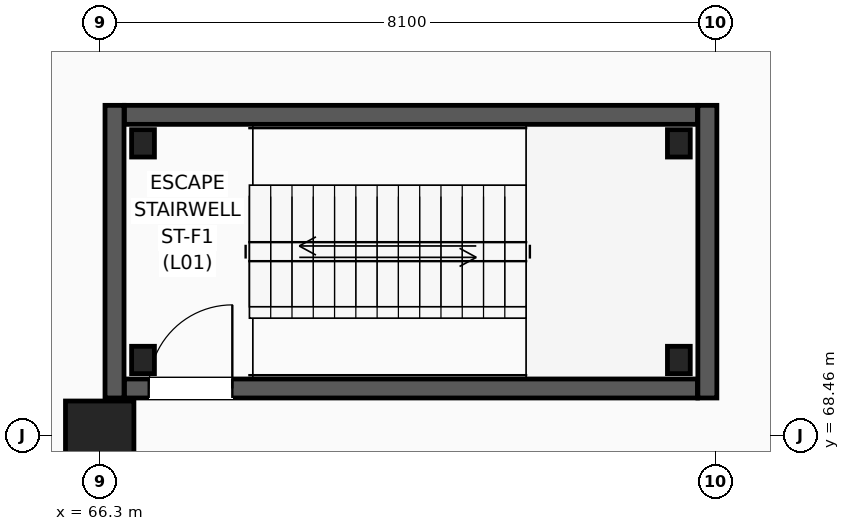
"""IFC4 building model, lengths in metres.
Left out: names, types, materials, properties, quantities, classifications, styles, units other than length and angle.
Written with IfcOpenShell. Run it as: python <this file> out.ifc"""

import sys

from ifc_helpers import new_model, si_unit, direction, frame, frame_2d, origin, origin_2d, place, context, subcontext, project, spatial, rectangle, i_section, extrude, element, fill, save


model = new_model("IFC4")
c1 = context("Model", 3, precision=1e-05, world=origin(), true_north=direction((0.0, 1.0)))
c2 = subcontext(c1, "Body", "Model", "MODEL_VIEW")
j1 = project(units=[si_unit("LENGTHUNIT", "METRE"), si_unit("PLANEANGLEUNIT", "RADIAN")], contexts=[c1])
p1 = place(None, origin())
s1 = spatial("IfcSite", under=j1, at=p1, CompositionType="ELEMENT")
p2 = place(p1, origin())
s2 = spatial("IfcBuilding", under=s1, at=p2, CompositionType="ELEMENT")
p3 = place(p2, frame((0.0, 0.0, 5.4)))
s3 = spatial("IfcBuildingStorey", under=s2, at=p3, CompositionType="ELEMENT", Elevation=5.4)
for number, where, z_axis, x_axis in (
    (1, (66.87, 69.45, 0.0), (0.0, 0.0, 1.0), (1.0, 0.0, 0.0)),
    (2, (66.87, 72.3, 0.0), (0.0, 0.0, 1.0), (1.0, 0.0, 0.0)),
    (3, (73.92, 69.45, 0.0), (0.0, 0.0, 1.0), (1.0, 0.0, 0.0)),
    (4, (73.92, 72.3, 0.0), (0.0, 0.0, 1.0), (1.0, 0.0, 0.0)),
):
    element("IfcColumn", number, at=place(p3, frame(where, z_axis=z_axis, x_axis=x_axis)), inside=s3, PredefinedType="COLUMN", context=c2, shape_type="SweptSolid", body=[
        extrude(i_section(OverallWidth=0.3, OverallDepth=0.36, WebThickness=0.012, FlangeThickness=0.022, FilletRadius=0.027, at=origin_2d()), origin(), (0.0, 0.0, 1.0), 4.8),
    ])
p4 = place(p3, frame((66.3, 68.46, 0.0), z_axis=(0.0, 0.0, 1.0), x_axis=(1.0, 0.0, 0.0)))
e5 = element("IfcColumn", 5, at=p4, inside=s3, PredefinedType="COLUMN", context=c2, shape_type="SweptSolid", body=[
    extrude(rectangle(XDim=0.9, YDim=0.9, at=origin_2d()), origin(), (0.0, 0.0, 1.0), 4.8),
])
p5 = place(p3, frame((66.625, 69.075, 0.0), z_axis=(0.0, 0.0, 1.0), x_axis=(1.0, 0.0, 0.0)))
e6 = element("IfcWall", 6, at=p5, inside=s3, PredefinedType="SHEAR", context=c2, shape_type="SweptSolid", body=[
    extrude(rectangle(XDim=7.54, YDim=0.25, at=frame_2d((3.77, 0.0))), origin(), (0.0, 0.0, 1.0), 4.525),
])
p6 = place(p5, frame((0.32, 0.0, 0.0)))
e7 = element("IfcOpeningElement", 7, at=p6, cuts=e6, PredefinedType="OPENING", context=c2, shape_type="SweptSolid", body=[
    extrude(rectangle(XDim=1.1, YDim=2.2, at=frame_2d((0.55, 1.1))), frame((0.0, 0.135, 0.0), z_axis=(0.0, -1.0, 0.0), x_axis=(1.0, 0.0, 0.0)), (0.0, 0.0, 1.0), 0.27),
])
p7 = place(p3, frame((66.625, 72.675, 0.0), z_axis=(0.0, 0.0, 1.0), x_axis=(1.0, 0.0, 0.0)))
e8 = element("IfcWall", 8, at=p7, inside=s3, PredefinedType="SHEAR", context=c2, shape_type="SweptSolid", body=[
    extrude(rectangle(XDim=7.54, YDim=0.25, at=frame_2d((3.77, 0.0))), origin(), (0.0, 0.0, 1.0), 4.525),
])
for number, where, z_axis, x_axis in (
    (9, (66.495, 68.95, 0.0), (0.0, 0.0, 1.0), (0.0, 1.0, 0.0)),
    (10, (74.295, 68.95, 0.0), (0.0, 0.0, 1.0), (0.0, 1.0, 0.0)),
):
    element("IfcWall", number, at=place(p3, frame(where, z_axis=z_axis, x_axis=x_axis)), inside=s3, PredefinedType="SHEAR", context=c2, shape_type="SweptSolid", body=[
        extrude(rectangle(XDim=3.85, YDim=0.25, at=frame_2d((1.925, 0.0))), origin(), (0.0, 0.0, 1.0), 4.525),
    ])
p8 = place(p6, origin())
e11 = element("IfcDoor", 11, at=p8, inside=s3, OperationType="SINGLE_SWING_RIGHT", PredefinedType="DOOR", context=c2, shape_type="SweptSolid", body=[
    extrude(rectangle(XDim=1.1, YDim=2.2, at=frame_2d((0.55, 1.1))), frame((0.0, 0.025, 0.0), z_axis=(0.0, -1.0, 0.0), x_axis=(1.0, 0.0, 0.0)), (0.0, 0.0, 1.0), 0.05),
])
fill(e7, e11)
save(model, sys.argv[1])
